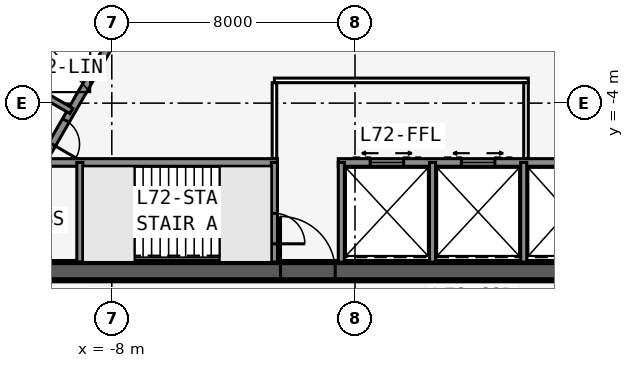
"""IFC4 building model, lengths in metres.
Left out: names, types, materials, properties, quantities, classifications, styles, units other than length and angle.
Written with IfcOpenShell. Run it as: python <this file> out.ifc"""

import sys

from ifc_helpers import new_model, si_unit, direction, frame, frame_2d, origin, place, context, subcontext, project, spatial, rectangle, extrude, element, fill, save


model = new_model("IFC4")
c1 = context("Model", 3, precision=1e-05, world=origin(), true_north=direction((0.0, 1.0)))
c2 = subcontext(c1, "Body", "Model", "MODEL_VIEW")
j1 = project(units=[si_unit("LENGTHUNIT", "METRE"), si_unit("PLANEANGLEUNIT", "RADIAN")], contexts=[c1])
p1 = place(None, origin())
s1 = spatial("IfcSite", under=j1, at=p1, CompositionType="ELEMENT")
p2 = place(p1, origin())
s2 = spatial("IfcBuilding", under=s1, at=p2, CompositionType="ELEMENT")
p3 = place(p2, frame((0.0, 0.0, 271.7)))
s3 = spatial("IfcBuildingStorey", under=s2, at=p3, CompositionType="ELEMENT", Elevation=271.7)
p4 = place(p3, frame((-16.5, -9.526, 0.0), z_axis=(0.0, 0.0, 1.0), x_axis=(1.0, 0.0, 0.0)))
e1 = element("IfcWall", 1, at=p4, inside=s3, PredefinedType="SHEAR", context=c2, shape_type="SweptSolid", body=[
    extrude(rectangle(XDim=33.0, YDim=0.6, at=frame_2d((16.5, 0.0))), origin(), (0.0, 0.0, 1.0), 3.6),
])
p5 = place(p4, frame((14.05, 0.0, 0.0)))
e2 = element("IfcOpeningElement", 2, at=p5, cuts=e1, PredefinedType="OPENING", context=c2, shape_type="SweptSolid", body=[
    extrude(rectangle(XDim=1.8, YDim=2.13, at=frame_2d((0.9, 1.065))), frame((0.0, 0.31, 0.0), z_axis=(0.0, -1.0, 0.0), x_axis=(1.0, 0.0, 0.0)), (0.0, 0.0, 1.0), 0.62),
])
p6 = place(p3, frame((-10.183, -5.951, 0.0), z_axis=(0.0, 0.0, 1.0), x_axis=(1.0, 0.0, 0.0)))
e3 = element("IfcWall", 3, at=p6, inside=s3, PredefinedType="SOLIDWALL", context=c2, shape_type="SweptSolid", body=[
    extrude(rectangle(XDim=7.633, YDim=0.25, at=frame_2d((3.816, 0.0))), origin(), (0.0, 0.0, 1.0), 3.35),
])
p7 = place(p3, frame((-0.55, -5.951, 0.0), z_axis=(0.0, 0.0, 1.0), x_axis=(1.0, 0.0, 0.0)))
e4 = element("IfcWall", 4, at=p7, inside=s3, PredefinedType="SOLIDWALL", context=c2, shape_type="SweptSolid", body=[
    extrude(rectangle(XDim=10.733, YDim=0.25, at=frame_2d((5.366, 0.0))), origin(), (0.0, 0.0, 1.0), 3.35),
])
p8 = place(p7, frame((9.314, 0.0, 0.0)))
e5 = element("IfcOpeningElement", 5, at=p8, cuts=e4, PredefinedType="OPENING", context=c2, shape_type="SweptSolid", body=[
    extrude(rectangle(XDim=0.9, YDim=2.13, at=frame_2d((0.45, 1.065))), frame((0.0, 0.135, 0.0), z_axis=(0.0, -1.0, 0.0), x_axis=(1.0, 0.0, 0.0)), (0.0, 0.0, 1.0), 0.27),
])
p9 = place(p7, frame((1.05, 0.0, 0.0)))
e6 = element("IfcOpeningElement", 6, at=p9, cuts=e4, PredefinedType="OPENING", context=c2, shape_type="SweptSolid", body=[
    extrude(rectangle(XDim=1.1, YDim=2.13, at=frame_2d((0.55, 1.065))), frame((0.0, 0.135, 0.0), z_axis=(0.0, -1.0, 0.0), x_axis=(1.0, 0.0, 0.0)), (0.0, 0.0, 1.0), 0.27),
])
p10 = place(p7, frame((4.05, 0.0, 0.0)))
e7 = element("IfcOpeningElement", 7, at=p10, cuts=e4, PredefinedType="OPENING", context=c2, shape_type="SweptSolid", body=[
    extrude(rectangle(XDim=1.1, YDim=2.13, at=frame_2d((0.55, 1.065))), frame((0.0, 0.135, 0.0), z_axis=(0.0, -1.0, 0.0), x_axis=(1.0, 0.0, 0.0)), (0.0, 0.0, 1.0), 0.27),
])
p11 = place(p3, frame((-9.05, -5.951, 0.0), z_axis=(0.0, 0.0, 1.0), x_axis=(0.0, -1.0, 0.0)))
e8 = element("IfcWall", 8, at=p11, inside=s3, PredefinedType="SOLIDWALL", context=c2, shape_type="SweptSolid", body=[
    extrude(rectangle(XDim=3.275, YDim=0.2, at=frame_2d((1.637, 0.0))), origin(), (0.0, 0.0, 1.0), 3.35),
])
p12 = place(p3, frame((-2.65, -5.951, 0.0), z_axis=(0.0, 0.0, 1.0), x_axis=(0.0, -1.0, 0.0)))
e9 = element("IfcWall", 9, at=p12, inside=s3, PredefinedType="SOLIDWALL", context=c2, shape_type="SweptSolid", body=[
    extrude(rectangle(XDim=3.275, YDim=0.2, at=frame_2d((1.637, 0.0))), origin(), (0.0, 0.0, 1.0), 3.35),
])
p13 = place(p12, frame((1.675, 0.0, 0.0)))
e10 = element("IfcOpeningElement", 10, at=p13, cuts=e9, PredefinedType="OPENING", context=c2, shape_type="SweptSolid", body=[
    extrude(rectangle(XDim=1.0, YDim=2.13, at=frame_2d((0.5, 1.065))), frame((0.0, 0.11, 0.0), z_axis=(0.0, -1.0, 0.0), x_axis=(1.0, 0.0, 0.0)), (0.0, 0.0, 1.0), 0.22),
])
for number, where, z_axis, x_axis in (
    (11, (-0.45, -5.951, 0.0), (0.0, 0.0, 1.0), (0.0, -1.0, 0.0)),
    (12, (2.55, -5.951, 0.0), (0.0, 0.0, 1.0), (0.0, -1.0, 0.0)),
    (13, (5.55, -5.951, 0.0), (0.0, 0.0, 1.0), (0.0, -1.0, 0.0)),
):
    element("IfcWall", number, at=place(p3, frame(where, z_axis=z_axis, x_axis=x_axis)), inside=s3, PredefinedType="SOLIDWALL", context=c2, shape_type="SweptSolid", body=[
        extrude(rectangle(XDim=3.275, YDim=0.2, at=frame_2d((1.637, 0.0))), origin(), (0.0, 0.0, 1.0), 3.35),
    ])
p14 = place(p3, frame((16.5, -9.526, 0.0), z_axis=(0.0, 0.0, 1.0), x_axis=(-0.499999749417, 0.866025548458, 0.0)))
e14 = element("IfcWall", 14, at=p14, inside=s3, PredefinedType="SHEAR", context=c2, shape_type="SweptSolid", body=[
    extrude(rectangle(XDim=33.0, YDim=0.6, at=frame_2d((16.5, 0.0))), origin(), (0.0, 0.0, 1.0), 3.6),
])
p15 = place(p14, frame((14.15, 0.0, 0.0)))
e15 = element("IfcOpeningElement", 15, at=p15, cuts=e14, PredefinedType="OPENING", context=c2, shape_type="SweptSolid", body=[
    extrude(rectangle(XDim=1.8, YDim=2.13, at=frame_2d((0.9, 1.065))), frame((0.0, 0.31, 0.0), z_axis=(0.0, -1.0, 0.0), x_axis=(1.0, 0.0, 0.0)), (0.0, 0.0, 1.0), 0.62),
])
p16 = place(p14, frame((12.6, 0.0, 0.0)))
e16 = element("IfcOpeningElement", 16, at=p16, cuts=e14, PredefinedType="OPENING", context=c2, shape_type="SweptSolid", body=[
    extrude(rectangle(XDim=1.0, YDim=2.13, at=frame_2d((0.5, 1.065))), frame((0.0, 0.31, 0.0), z_axis=(0.0, -1.0, 0.0), x_axis=(1.0, 0.0, 0.0)), (0.0, 0.0, 1.0), 0.62),
])
p17 = place(p3, frame((10.245, -5.843, 0.0), z_axis=(0.0, 0.0, 1.0), x_axis=(-0.499993009313, 0.866029439822, 0.0)))
e17 = element("IfcWall", 17, at=p17, inside=s3, PredefinedType="SOLIDWALL", context=c2, shape_type="SweptSolid", body=[
    extrude(rectangle(XDim=7.733, YDim=0.25, at=frame_2d((3.866, 0.0))), origin(), (0.0, 0.0, 1.0), 3.35),
])
p18 = place(p3, frame((0.0, 19.052, 0.0), z_axis=(0.0, 0.0, 1.0), x_axis=(-0.499999749417, -0.866025548458, 0.0)))
e18 = element("IfcWall", 18, at=p18, inside=s3, PredefinedType="SHEAR", context=c2, shape_type="SweptSolid", body=[
    extrude(rectangle(XDim=33.0, YDim=0.6, at=frame_2d((16.5, 0.0))), origin(), (0.0, 0.0, 1.0), 3.6),
])
p19 = place(p18, frame((14.15, 0.0, 0.0)))
e19 = element("IfcOpeningElement", 19, at=p19, cuts=e18, PredefinedType="OPENING", context=c2, shape_type="SweptSolid", body=[
    extrude(rectangle(XDim=1.8, YDim=2.13, at=frame_2d((0.9, 1.065))), frame((0.0, 0.31, 0.0), z_axis=(0.0, -1.0, 0.0), x_axis=(1.0, 0.0, 0.0)), (0.0, 0.0, 1.0), 0.62),
])
p20 = place(p18, frame((12.6, 0.0, 0.0)))
e20 = element("IfcOpeningElement", 20, at=p20, cuts=e18, PredefinedType="OPENING", context=c2, shape_type="SweptSolid", body=[
    extrude(rectangle(XDim=1.0, YDim=2.13, at=frame_2d((0.5, 1.065))), frame((0.0, 0.31, 0.0), z_axis=(0.0, -1.0, 0.0), x_axis=(1.0, 0.0, 0.0)), (0.0, 0.0, 1.0), 0.62),
])
p21 = place(p3, frame((-4.929, 3.365, 0.0), z_axis=(0.0, 0.0, 1.0), x_axis=(-0.499991433582, -0.866030349552, 0.0)))
e21 = element("IfcWall", 21, at=p21, inside=s3, PredefinedType="SOLIDWALL", context=c2, shape_type="SweptSolid", body=[
    extrude(rectangle(XDim=10.633, YDim=0.25, at=frame_2d((5.316, 0.0))), origin(), (0.0, 0.0, 1.0), 3.35),
])
p22 = place(p21, frame((9.164, 0.0, 0.0)))
e22 = element("IfcOpeningElement", 22, at=p22, cuts=e21, PredefinedType="OPENING", context=c2, shape_type="SweptSolid", body=[
    extrude(rectangle(XDim=0.9, YDim=2.13, at=frame_2d((0.45, 1.065))), frame((0.0, 0.135, 0.0), z_axis=(0.0, -1.0, 0.0), x_axis=(1.0, 0.0, 0.0)), (0.0, 0.0, 1.0), 0.27),
])
p23 = place(p21, frame((1.1, 0.0, 0.0)))
e23 = element("IfcOpeningElement", 23, at=p23, cuts=e21, PredefinedType="OPENING", context=c2, shape_type="SweptSolid", body=[
    extrude(rectangle(XDim=0.9, YDim=2.13, at=frame_2d((0.45, 1.065))), frame((0.0, 0.135, 0.0), z_axis=(0.0, -1.0, 0.0), x_axis=(1.0, 0.0, 0.0)), (0.0, 0.0, 1.0), 0.27),
])
p24 = place(p21, frame((4.0, 0.0, 0.0)))
e24 = element("IfcOpeningElement", 24, at=p24, cuts=e21, PredefinedType="OPENING", context=c2, shape_type="SweptSolid", body=[
    extrude(rectangle(XDim=0.9, YDim=2.13, at=frame_2d((0.45, 1.065))), frame((0.0, 0.135, 0.0), z_axis=(0.0, -1.0, 0.0), x_axis=(1.0, 0.0, 0.0)), (0.0, 0.0, 1.0), 0.27),
])
p25 = place(p3, frame((-9.329, -4.256, 0.0), z_axis=(0.0, 0.0, 1.0), x_axis=(-0.866027924134, 0.499995634601, 0.0)))
e25 = element("IfcWall", 25, at=p25, inside=s3, PredefinedType="SOLIDWALL", context=c2, shape_type="SweptSolid", body=[
    extrude(rectangle(XDim=3.275, YDim=0.2, at=frame_2d((1.637, 0.0))), origin(), (0.0, 0.0, 1.0), 3.35),
])
p26 = place(p3, frame((20.177, -11.245, 0.0), z_axis=(0.0, 0.0, 1.0), x_axis=(-0.499998875317, 0.866026053119, 0.0)))
e26 = element("IfcWall", 26, at=p26, inside=s3, PredefinedType="PARTITIONING", context=c2, shape_type="SweptSolid", body=[
    extrude(rectangle(XDim=39.654, YDim=0.15, at=frame_2d((19.827, 0.0))), origin(), (0.0, 0.0, 1.0), 3.35),
])
p27 = place(p26, frame((11.352, 0.0, 0.0)))
e27 = element("IfcOpeningElement", 27, at=p27, cuts=e26, PredefinedType="OPENING", context=c2, shape_type="SweptSolid", body=[
    extrude(rectangle(XDim=0.95, YDim=2.13, at=frame_2d((0.475, 1.065))), frame((0.0, 0.085, 0.0), z_axis=(0.0, -1.0, 0.0), x_axis=(1.0, 0.0, 0.0)), (0.0, 0.0, 1.0), 0.17),
])
p28 = place(p3, frame((-0.35, 23.096, 0.0), z_axis=(0.0, 0.0, 1.0), x_axis=(-0.499998875317, -0.866026053119, 0.0)))
e28 = element("IfcWall", 28, at=p28, inside=s3, PredefinedType="PARTITIONING", context=c2, shape_type="SweptSolid", body=[
    extrude(rectangle(XDim=39.654, YDim=0.15, at=frame_2d((19.827, 0.0))), origin(), (0.0, 0.0, 1.0), 3.35),
])
p29 = place(p28, frame((3.272, 0.0, 0.0)))
e29 = element("IfcOpeningElement", 29, at=p29, cuts=e28, PredefinedType="OPENING", context=c2, shape_type="SweptSolid", body=[
    extrude(rectangle(XDim=0.95, YDim=2.13, at=frame_2d((0.475, 1.065))), frame((0.0, 0.085, 0.0), z_axis=(0.0, -1.0, 0.0), x_axis=(1.0, 0.0, 0.0)), (0.0, 0.0, 1.0), 0.17),
])
p30 = place(p28, frame((19.052, 0.0, 0.0)))
e30 = element("IfcOpeningElement", 30, at=p30, cuts=e28, PredefinedType="OPENING", context=c2, shape_type="SweptSolid", body=[
    extrude(rectangle(XDim=0.95, YDim=2.13, at=frame_2d((0.475, 1.065))), frame((0.0, 0.085, 0.0), z_axis=(0.0, -1.0, 0.0), x_axis=(1.0, 0.0, 0.0)), (0.0, 0.0, 1.0), 0.17),
])
p31 = place(p28, frame((35.432, 0.0, 0.0)))
e31 = element("IfcOpeningElement", 31, at=p31, cuts=e28, PredefinedType="OPENING", context=c2, shape_type="SweptSolid", body=[
    extrude(rectangle(XDim=0.95, YDim=2.13, at=frame_2d((0.475, 1.065))), frame((0.0, 0.085, 0.0), z_axis=(0.0, -1.0, 0.0), x_axis=(1.0, 0.0, 0.0)), (0.0, 0.0, 1.0), 0.17),
])
p32 = place(p3, frame((-2.65, -3.251, 0.0), z_axis=(0.0, 0.0, 1.0), x_axis=(1.0, 0.0, 0.0)))
e32 = element("IfcWall", 32, at=p32, inside=s3, PredefinedType="PARTITIONING", context=c2, shape_type="SweptSolid", body=[
    extrude(rectangle(XDim=8.35, YDim=0.15, at=frame_2d((4.175, 0.0))), origin(), (0.0, 0.0, 1.0), 3.35),
])
for number, where, z_axis, x_axis in (
    (33, (-2.65, -5.826, 0.0), (0.0, 0.0, 1.0), (0.0, 1.0, 0.0)),
    (34, (5.625, -5.826, 0.0), (0.0, 0.0, 1.0), (0.0, 1.0, 0.0)),
):
    element("IfcWall", number, at=place(p3, frame(where, z_axis=z_axis, x_axis=x_axis)), inside=s3, PredefinedType="PARTITIONING", context=c2, shape_type="SweptSolid", body=[
        extrude(rectangle(XDim=2.5, YDim=0.15, at=frame_2d((1.25, 0.0))), origin(), (0.0, 0.0, 1.0), 3.35),
    ])
p33 = place(p3, frame((-7.247, -7.576, 0.0), z_axis=(0.0, 0.0, 1.0), x_axis=(1.0, 0.0, 0.0)))
e35 = element("IfcWall", 35, at=p33, inside=s3, PredefinedType="SOLIDWALL", context=c2, shape_type="SweptSolid", body=[
    extrude(rectangle(XDim=2.794, YDim=0.1, at=frame_2d((1.397, 0.0))), origin(), (0.0, 0.0, 1.0), 3.6),
])
p34 = place(p5, origin())
e36 = element("IfcDoor", 36, at=p34, inside=s3, OperationType="DOUBLE_DOOR_SINGLE_SWING", PredefinedType="DOOR", context=c2, shape_type="SweptSolid", body=[
    extrude(rectangle(XDim=1.8, YDim=2.13, at=frame_2d((0.9, 1.065))), frame((0.0, 0.025, 0.0), z_axis=(0.0, -1.0, 0.0), x_axis=(1.0, 0.0, 0.0)), (0.0, 0.0, 1.0), 0.05),
])
fill(e2, e36)
p35 = place(p13, origin())
e37 = element("IfcDoor", 37, at=p35, inside=s3, OperationType="SINGLE_SWING_RIGHT", PredefinedType="DOOR", context=c2, shape_type="SweptSolid", body=[
    extrude(rectangle(XDim=1.0, YDim=2.13, at=frame_2d((0.5, 1.065))), frame((0.0, 0.025, 0.0), z_axis=(0.0, -1.0, 0.0), x_axis=(1.0, 0.0, 0.0)), (0.0, 0.0, 1.0), 0.05),
])
fill(e10, e37)
p36 = place(p22, origin())
e38 = element("IfcDoor", 38, at=p36, inside=s3, OperationType="SINGLE_SWING_RIGHT", PredefinedType="DOOR", context=c2, shape_type="SweptSolid", body=[
    extrude(rectangle(XDim=0.9, YDim=2.13, at=frame_2d((0.45, 1.065))), frame((0.0, 0.025, 0.0), z_axis=(0.0, -1.0, 0.0), x_axis=(1.0, 0.0, 0.0)), (0.0, 0.0, 1.0), 0.05),
])
fill(e22, e38)
p37 = place(p9, origin())
e39 = element("IfcDoor", 39, at=p37, inside=s3, OperationType="DOUBLE_DOOR_SLIDING", PredefinedType="USERDEFINED", context=c2, shape_type="SweptSolid", body=[
    extrude(rectangle(XDim=1.1, YDim=2.13, at=frame_2d((0.55, 1.065))), frame((0.0, 0.025, 0.0), z_axis=(0.0, -1.0, 0.0), x_axis=(1.0, 0.0, 0.0)), (0.0, 0.0, 1.0), 0.05),
])
fill(e6, e39)
p38 = place(p10, origin())
e40 = element("IfcDoor", 40, at=p38, inside=s3, OperationType="DOUBLE_DOOR_SLIDING", PredefinedType="USERDEFINED", context=c2, shape_type="SweptSolid", body=[
    extrude(rectangle(XDim=1.1, YDim=2.13, at=frame_2d((0.55, 1.065))), frame((0.0, 0.025, 0.0), z_axis=(0.0, -1.0, 0.0), x_axis=(1.0, 0.0, 0.0)), (0.0, 0.0, 1.0), 0.05),
])
fill(e7, e40)
save(model, sys.argv[1])
